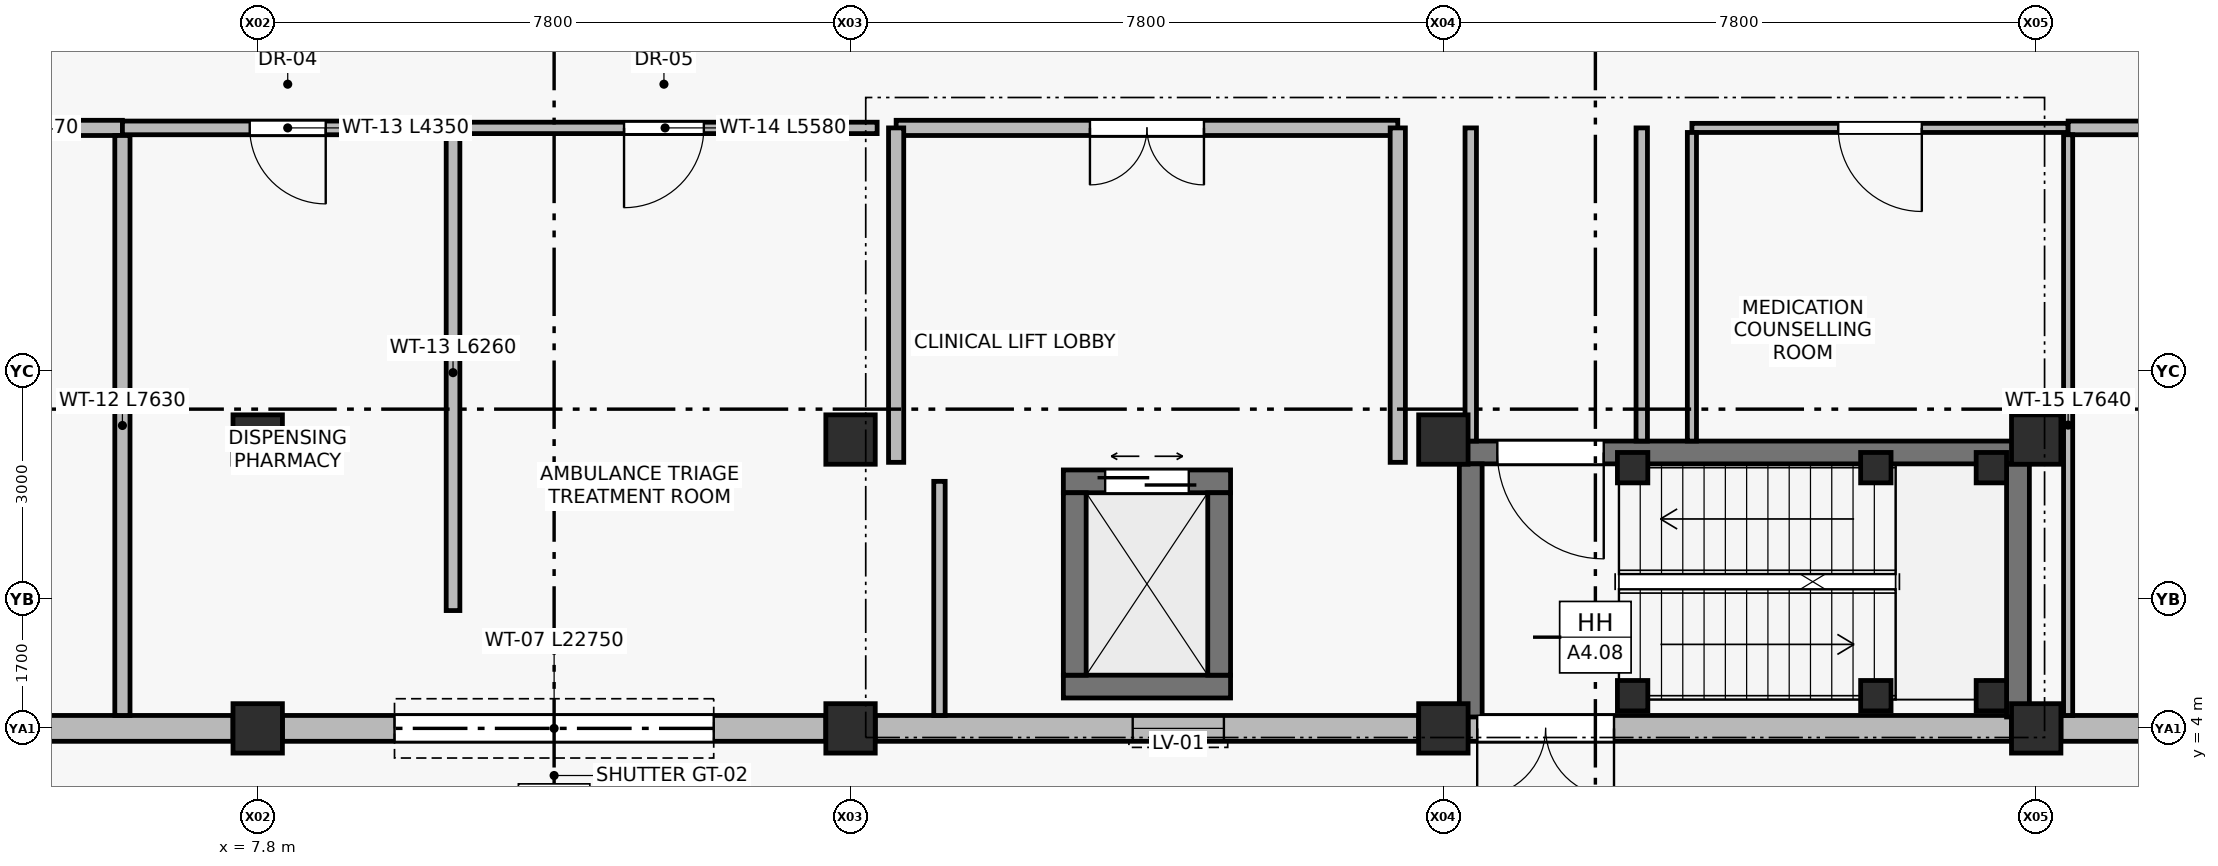
"""IFC4 building model, lengths in metres.
Left out: names, types, materials, properties, quantities, classifications, styles, units other than length and angle.
Written with IfcOpenShell. Run it as: python <this file> out.ifc"""

import sys

from ifc_helpers import new_model, si_unit, direction, frame, frame_2d, origin, origin_2d, place, context, subcontext, project, spatial, rectangle, extrude, element, fill, save


model = new_model("IFC4")
c1 = context("Model", 3, precision=1e-05, world=origin(), true_north=direction((0.0, 1.0)))
c2 = subcontext(c1, "Body", "Model", "MODEL_VIEW")
j1 = project(units=[si_unit("LENGTHUNIT", "METRE"), si_unit("PLANEANGLEUNIT", "RADIAN")], contexts=[c1])
p1 = place(None, origin())
s1 = spatial("IfcSite", under=j1, at=p1, CompositionType="ELEMENT")
p2 = place(p1, origin())
s2 = spatial("IfcBuilding", under=s1, at=p2, CompositionType="ELEMENT")
p3 = place(p2, origin())
s3 = spatial("IfcBuildingStorey", under=s2, at=p3, CompositionType="ELEMENT", Elevation=0.0)
for number, where, z_axis, x_axis in (
    (1, (7.8, 4.0, 0.0), (0.0, 0.0, 1.0), (1.0, 0.0, 0.0)),
    (2, (7.8, 7.8, 0.0), (0.0, 0.0, 1.0), (1.0, 0.0, 0.0)),
    (3, (15.6, 4.0, 0.0), (0.0, 0.0, 1.0), (1.0, 0.0, 0.0)),
    (4, (15.6, 7.8, 0.0), (0.0, 0.0, 1.0), (1.0, 0.0, 0.0)),
    (5, (23.4, 4.0, 0.0), (0.0, 0.0, 1.0), (1.0, 0.0, 0.0)),
    (6, (23.4, 7.8, 0.0), (0.0, 0.0, 1.0), (1.0, 0.0, 0.0)),
    (7, (31.2, 4.0, 0.0), (0.0, 0.0, 1.0), (1.0, 0.0, 0.0)),
    (8, (31.2, 7.8, 0.0), (0.0, 0.0, 1.0), (1.0, 0.0, 0.0)),
):
    element("IfcColumn", number, at=place(p3, frame(where, z_axis=z_axis, x_axis=x_axis)), inside=s3, PredefinedType="COLUMN", context=c2, shape_type="SweptSolid", body=[
        extrude(rectangle(XDim=0.65, YDim=0.65, at=origin_2d()), origin(), (0.0, 0.0, 1.0), 4.8),
    ])
for number, where, z_axis, x_axis in (
    (9, (25.89, 4.43, 0.0), (0.0, 0.0, 1.0), (1.0, 0.0, 0.0)),
    (10, (25.89, 7.43, 0.0), (0.0, 0.0, 1.0), (1.0, 0.0, 0.0)),
    (11, (29.09, 4.43, 0.0), (0.0, 0.0, 1.0), (1.0, 0.0, 0.0)),
    (12, (29.09, 7.43, 0.0), (0.0, 0.0, 1.0), (1.0, 0.0, 0.0)),
    (13, (30.61, 4.43, 0.0), (0.0, 0.0, 1.0), (1.0, 0.0, 0.0)),
    (14, (30.61, 7.43, 0.0), (0.0, 0.0, 1.0), (1.0, 0.0, 0.0)),
):
    element("IfcColumn", number, at=place(p3, frame(where, z_axis=z_axis, x_axis=x_axis)), inside=s3, PredefinedType="COLUMN", context=c2, shape_type="SweptSolid", body=[
        extrude(rectangle(XDim=0.4, YDim=0.4, at=origin_2d()), origin(), (0.0, 0.0, 1.0), 4.8),
    ])
p4 = place(p3, frame((7.475, 4.0, 0.0), z_axis=(0.0, 0.0, 1.0), x_axis=(-1.0, 0.0, 0.0)))
e15 = element("IfcWall", 15, at=p4, inside=s3, PredefinedType="STANDARD", context=c2, shape_type="SweptSolid", body=[
    extrude(rectangle(XDim=7.15, YDim=0.34, at=frame_2d((3.575, 0.0))), origin(), (0.0, 0.0, 1.0), 4.04),
])
p5 = place(p4, frame((3.768, 0.0, 0.9)))
e16 = element("IfcOpeningElement", 16, at=p5, cuts=e15, PredefinedType="OPENING", context=c2, shape_type="SweptSolid", body=[
    extrude(rectangle(XDim=1.05, YDim=1.65, at=frame_2d((0.525, 0.825))), frame((0.0, 0.18, 0.0), z_axis=(0.0, -1.0, 0.0), x_axis=(1.0, 0.0, 0.0)), (0.0, 0.0, 1.0), 0.36),
])
p6 = place(p3, frame((15.275, 4.0, 0.0), z_axis=(0.0, 0.0, 1.0), x_axis=(-1.0, 0.0, 0.0)))
e17 = element("IfcWall", 17, at=p6, inside=s3, PredefinedType="STANDARD", context=c2, shape_type="SweptSolid", body=[
    extrude(rectangle(XDim=7.15, YDim=0.34, at=frame_2d((3.575, 0.0))), origin(), (0.0, 0.0, 1.0), 3.35),
])
p7 = place(p6, frame((1.475, 0.0, 0.0)))
e18 = element("IfcOpeningElement", 18, at=p7, cuts=e17, PredefinedType="OPENING", context=c2, shape_type="SweptSolid", body=[
    extrude(rectangle(XDim=4.2, YDim=3.1, at=frame_2d((2.1, 1.55))), frame((0.0, 0.18, 0.0), z_axis=(0.0, -1.0, 0.0), x_axis=(1.0, 0.0, 0.0)), (0.0, 0.0, 1.0), 0.36),
])
p8 = place(p3, frame((23.075, 4.0, 0.0), z_axis=(0.0, 0.0, 1.0), x_axis=(-1.0, 0.0, 0.0)))
e19 = element("IfcWall", 19, at=p8, inside=s3, PredefinedType="STANDARD", context=c2, shape_type="SweptSolid", body=[
    extrude(rectangle(XDim=7.15, YDim=0.34, at=frame_2d((3.575, 0.0))), origin(), (0.0, 0.0, 1.0), 4.04),
])
p9 = place(p8, frame((2.562, 0.0, 0.9)))
e20 = element("IfcOpeningElement", 20, at=p9, cuts=e19, PredefinedType="OPENING", context=c2, shape_type="SweptSolid", body=[
    extrude(rectangle(XDim=1.2, YDim=1.5, at=frame_2d((0.6, 0.75))), frame((0.0, 0.18, 0.0), z_axis=(0.0, -1.0, 0.0), x_axis=(1.0, 0.0, 0.0)), (0.0, 0.0, 1.0), 0.36),
])
p10 = place(p3, frame((30.875, 4.0, 0.0), z_axis=(0.0, 0.0, 1.0), x_axis=(-1.0, 0.0, 0.0)))
e21 = element("IfcWall", 21, at=p10, inside=s3, PredefinedType="STANDARD", context=c2, shape_type="SweptSolid", body=[
    extrude(rectangle(XDim=7.15, YDim=0.34, at=frame_2d((3.575, 0.0))), origin(), (0.0, 0.0, 1.0), 4.04),
])
p11 = place(p10, frame((5.23, 0.0, 0.0)))
e22 = element("IfcOpeningElement", 22, at=p11, cuts=e21, PredefinedType="OPENING", context=c2, shape_type="SweptSolid", body=[
    extrude(rectangle(XDim=1.8, YDim=2.25, at=frame_2d((0.9, 1.125))), frame((0.0, 0.18, 0.0), z_axis=(0.0, -1.0, 0.0), x_axis=(1.0, 0.0, 0.0)), (0.0, 0.0, 1.0), 0.36),
])
p12 = place(p3, frame((38.675, 4.0, 0.0), z_axis=(0.0, 0.0, 1.0), x_axis=(-1.0, 0.0, 0.0)))
e23 = element("IfcWall", 23, at=p12, inside=s3, PredefinedType="STANDARD", context=c2, shape_type="SweptSolid", body=[
    extrude(rectangle(XDim=7.15, YDim=0.34, at=frame_2d((3.575, 0.0))), origin(), (0.0, 0.0, 1.0), 3.35),
])
p13 = place(p12, frame((1.475, 0.0, 0.0)))
e24 = element("IfcOpeningElement", 24, at=p13, cuts=e23, PredefinedType="OPENING", context=c2, shape_type="SweptSolid", body=[
    extrude(rectangle(XDim=4.2, YDim=3.1, at=frame_2d((2.1, 1.55))), frame((0.0, 0.18, 0.0), z_axis=(0.0, -1.0, 0.0), x_axis=(1.0, 0.0, 0.0)), (0.0, 0.0, 1.0), 0.36),
])
p14 = place(p3, frame((31.11, 7.63, 0.0), z_axis=(0.0, 0.0, 1.0), x_axis=(-1.0, 0.0, 0.0)))
e25 = element("IfcWall", 25, at=p14, inside=s3, PredefinedType="SHEAR", context=c2, shape_type="SweptSolid", body=[
    extrude(rectangle(XDim=7.5, YDim=0.3, at=frame_2d((3.75, 0.0))), origin(), (0.0, 0.0, 1.0), 4.54),
])
p15 = place(p14, frame((5.6, 0.0, 0.0)))
e26 = element("IfcOpeningElement", 26, at=p15, cuts=e25, PredefinedType="OPENING", context=c2, shape_type="SweptSolid", body=[
    extrude(rectangle(XDim=1.4, YDim=2.2, at=frame_2d((0.7, 1.1))), frame((0.0, 0.16, 0.0), z_axis=(0.0, -1.0, 0.0), x_axis=(1.0, 0.0, 0.0)), (0.0, 0.0, 1.0), 0.32),
])
for number, where, z_axis, x_axis in (
    (27, (23.76, 7.48, 0.0), (0.0, 0.0, 1.0), (0.0, -1.0, 0.0)),
    (28, (30.96, 4.15, 0.0), (0.0, 0.0, 1.0), (0.0, 1.0, 0.0)),
):
    element("IfcWall", number, at=place(p3, frame(where, z_axis=z_axis, x_axis=x_axis)), inside=s3, PredefinedType="SHEAR", context=c2, shape_type="SweptSolid", body=[
        extrude(rectangle(XDim=3.33, YDim=0.3, at=frame_2d((1.665, 0.0))), origin(), (0.0, 0.0, 1.0), 4.54),
    ])
p16 = place(p3, frame((18.4, 4.55, 0.0), z_axis=(0.0, 0.0, 1.0), x_axis=(1.0, 0.0, 0.0)))
e29 = element("IfcWall", 29, at=p16, inside=s3, PredefinedType="SHEAR", context=c2, shape_type="SweptSolid", body=[
    extrude(rectangle(XDim=2.2, YDim=0.3, at=frame_2d((1.1, 0.0))), origin(), (0.0, 0.0, 1.0), 4.54),
])
p17 = place(p3, frame((20.6, 7.25, 0.0), z_axis=(0.0, 0.0, 1.0), x_axis=(-1.0, 0.0, 0.0)))
e30 = element("IfcWall", 30, at=p17, inside=s3, PredefinedType="SHEAR", context=c2, shape_type="SweptSolid", body=[
    extrude(rectangle(XDim=2.2, YDim=0.3, at=frame_2d((1.1, 0.0))), origin(), (0.0, 0.0, 1.0), 4.54),
])
p18 = place(p17, frame((0.55, 0.0, 0.0)))
e31 = element("IfcOpeningElement", 31, at=p18, cuts=e30, PredefinedType="OPENING", context=c2, shape_type="SweptSolid", body=[
    extrude(rectangle(XDim=1.1, YDim=2.2, at=frame_2d((0.55, 1.1))), frame((0.0, 0.16, 0.0), z_axis=(0.0, -1.0, 0.0), x_axis=(1.0, 0.0, 0.0)), (0.0, 0.0, 1.0), 0.32),
])
for number, where, z_axis, x_axis in (
    (32, (18.55, 7.1, 0.0), (0.0, 0.0, 1.0), (0.0, -1.0, 0.0)),
    (33, (20.45, 4.7, 0.0), (0.0, 0.0, 1.0), (0.0, 1.0, 0.0)),
):
    element("IfcWall", number, at=place(p3, frame(where, z_axis=z_axis, x_axis=x_axis)), inside=s3, PredefinedType="SHEAR", context=c2, shape_type="SweptSolid", body=[
        extrude(rectangle(XDim=2.4, YDim=0.3, at=frame_2d((1.2, 0.0))), origin(), (0.0, 0.0, 1.0), 4.54),
    ])
p19 = place(p3, frame((22.8, 11.9, 0.0), z_axis=(0.0, 0.0, 1.0), x_axis=(-1.0, 0.0, 0.0)))
e34 = element("IfcWall", 34, at=p19, inside=s3, PredefinedType="SOLIDWALL", context=c2, shape_type="SweptSolid", body=[
    extrude(rectangle(XDim=6.6, YDim=0.2, at=frame_2d((3.3, 0.0))), origin(), (0.0, 0.0, 1.0), 4.54),
])
p20 = place(p19, frame((2.55, 0.0, 0.0)))
e35 = element("IfcOpeningElement", 35, at=p20, cuts=e34, PredefinedType="OPENING", context=c2, shape_type="SweptSolid", body=[
    extrude(rectangle(XDim=1.5, YDim=2.2, at=frame_2d((0.75, 1.1))), frame((0.0, 0.11, 0.0), z_axis=(0.0, -1.0, 0.0), x_axis=(1.0, 0.0, 0.0)), (0.0, 0.0, 1.0), 0.22),
])
for number, where, z_axis, x_axis in (
    (36, (16.2, 11.9, 0.0), (0.0, 0.0, 1.0), (0.0, -1.0, 0.0)),
    (37, (22.8, 7.5, 0.0), (0.0, 0.0, 1.0), (0.0, 1.0, 0.0)),
):
    element("IfcWall", number, at=place(p3, frame(where, z_axis=z_axis, x_axis=x_axis)), inside=s3, PredefinedType="SOLIDWALL", context=c2, shape_type="SweptSolid", body=[
        extrude(rectangle(XDim=4.4, YDim=0.2, at=frame_2d((2.2, 0.0))), origin(), (0.0, 0.0, 1.0), 4.54),
    ])
p21 = place(p3, frame((23.76, 7.78, 0.0), z_axis=(0.0, 0.0, 1.0), x_axis=(0.0, 1.0, 0.0)))
e38 = element("IfcWall", 38, at=p21, inside=s3, PredefinedType="PARTITIONING", context=c2, shape_type="SweptSolid", body=[
    extrude(rectangle(XDim=4.12, YDim=0.15, at=frame_2d((2.06, 0.0))), origin(), (0.0, 0.0, 1.0), 4.09),
])
p22 = place(p3, frame((26.01, 7.78, 0.0), z_axis=(0.0, 0.0, 1.0), x_axis=(0.0, 1.0, 0.0)))
e39 = element("IfcWall", 39, at=p22, inside=s3, PredefinedType="PARTITIONING", context=c2, shape_type="SweptSolid", body=[
    extrude(rectangle(XDim=4.12, YDim=0.15, at=frame_2d((2.06, 0.0))), origin(), (0.0, 0.0, 1.0), 4.54),
])
p23 = place(p3, frame((6.02, 11.9, 0.0), z_axis=(0.0, 0.0, 1.0), x_axis=(-1.0, 0.0, 0.0)))
e40 = element("IfcWall", 40, at=p23, inside=s3, PredefinedType="SOLIDWALL", context=c2, shape_type="SweptSolid", body=[
    extrude(rectangle(XDim=4.47, YDim=0.2, at=frame_2d((2.235, 0.0))), origin(), (0.0, 0.0, 1.0), 4.54),
])
p24 = place(p23, frame((2.475, 0.0, 0.0)))
e41 = element("IfcOpeningElement", 41, at=p24, cuts=e40, PredefinedType="OPENING", context=c2, shape_type="SweptSolid", body=[
    extrude(rectangle(XDim=0.9, YDim=2.1, at=frame_2d((0.45, 1.05))), frame((0.0, 0.11, 0.0), z_axis=(0.0, -1.0, 0.0), x_axis=(1.0, 0.0, 0.0)), (0.0, 0.0, 1.0), 0.22),
])
p25 = place(p3, frame((10.37, 11.9, 0.0), z_axis=(0.0, 0.0, 1.0), x_axis=(-1.0, 0.0, 0.0)))
e42 = element("IfcWall", 42, at=p25, inside=s3, PredefinedType="PARTITIONING", context=c2, shape_type="SweptSolid", body=[
    extrude(rectangle(XDim=4.35, YDim=0.18, at=frame_2d((2.175, 0.0))), origin(), (0.0, 0.0, 1.0), 4.54),
])
p26 = place(p25, frame((1.675, 0.0, 0.0)))
e43 = element("IfcOpeningElement", 43, at=p26, cuts=e42, PredefinedType="OPENING", context=c2, shape_type="SweptSolid", body=[
    extrude(rectangle(XDim=1.0, YDim=2.1, at=frame_2d((0.5, 1.05))), frame((0.0, 0.1, 0.0), z_axis=(0.0, -1.0, 0.0), x_axis=(1.0, 0.0, 0.0)), (0.0, 0.0, 1.0), 0.2),
])
p27 = place(p3, frame((15.95, 11.9, 0.0), z_axis=(0.0, 0.0, 1.0), x_axis=(-1.0, 0.0, 0.0)))
e44 = element("IfcWall", 44, at=p27, inside=s3, PredefinedType="PARTITIONING", context=c2, shape_type="SweptSolid", body=[
    extrude(rectangle(XDim=5.58, YDim=0.15, at=frame_2d((2.79, 0.0))), origin(), (0.0, 0.0, 1.0), 4.54),
])
p28 = place(p27, frame((2.28, 0.0, 0.0)))
e45 = element("IfcOpeningElement", 45, at=p28, cuts=e44, PredefinedType="OPENING", context=c2, shape_type="SweptSolid", body=[
    extrude(rectangle(XDim=1.05, YDim=2.15, at=frame_2d((0.525, 1.075))), frame((0.0, 0.085, 0.0), z_axis=(0.0, -1.0, 0.0), x_axis=(1.0, 0.0, 0.0)), (0.0, 0.0, 1.0), 0.17),
])
p29 = place(p3, frame((31.62, 11.9, 0.0), z_axis=(0.0, 0.0, 1.0), x_axis=(-1.0, 0.0, 0.0)))
e46 = element("IfcWall", 46, at=p29, inside=s3, PredefinedType="PARTITIONING", context=c2, shape_type="SweptSolid", body=[
    extrude(rectangle(XDim=4.95, YDim=0.12, at=frame_2d((2.475, 0.0))), origin(), (0.0, 0.0, 1.0), 4.54),
])
p30 = place(p29, frame((1.925, 0.0, 0.0)))
e47 = element("IfcOpeningElement", 47, at=p30, cuts=e46, PredefinedType="OPENING", context=c2, shape_type="SweptSolid", body=[
    extrude(rectangle(XDim=1.1, YDim=2.15, at=frame_2d((0.55, 1.075))), frame((0.0, 0.07, 0.0), z_axis=(0.0, -1.0, 0.0), x_axis=(1.0, 0.0, 0.0)), (0.0, 0.0, 1.0), 0.14),
])
p31 = place(p3, frame((39.15, 11.9, 0.0), z_axis=(0.0, 0.0, 1.0), x_axis=(-1.0, 0.0, 0.0)))
e48 = element("IfcWall", 48, at=p31, inside=s3, PredefinedType="PARTITIONING", context=c2, shape_type="SweptSolid", body=[
    extrude(rectangle(XDim=7.53, YDim=0.18, at=frame_2d((3.765, 0.0))), origin(), (0.0, 0.0, 1.0), 4.54),
])
p32 = place(p31, frame((3.19, 0.0, 0.0)))
e49 = element("IfcOpeningElement", 49, at=p32, cuts=e48, PredefinedType="OPENING", context=c2, shape_type="SweptSolid", body=[
    extrude(rectangle(XDim=1.15, YDim=2.2, at=frame_2d((0.575, 1.1))), frame((0.0, 0.1, 0.0), z_axis=(0.0, -1.0, 0.0), x_axis=(1.0, 0.0, 0.0)), (0.0, 0.0, 1.0), 0.2),
])
p33 = place(p3, frame((6.02, 4.17, 0.0), z_axis=(0.0, 0.0, 1.0), x_axis=(0.0, 1.0, 0.0)))
e50 = element("IfcWall", 50, at=p33, inside=s3, PredefinedType="SOLIDWALL", context=c2, shape_type="SweptSolid", body=[
    extrude(rectangle(XDim=7.63, YDim=0.2, at=frame_2d((3.815, 0.0))), origin(), (0.0, 0.0, 1.0), 4.54),
])
p34 = place(p3, frame((10.37, 5.55, 0.0), z_axis=(0.0, 0.0, 1.0), x_axis=(0.0, 1.0, 0.0)))
e51 = element("IfcWall", 51, at=p34, inside=s3, PredefinedType="PARTITIONING", context=c2, shape_type="SweptSolid", body=[
    extrude(rectangle(XDim=6.26, YDim=0.18, at=frame_2d((3.13, 0.0))), origin(), (0.0, 0.0, 1.0), 4.21),
])
p35 = place(p3, frame((16.77, 4.17, 0.0), z_axis=(0.0, 0.0, 1.0), x_axis=(0.0, 1.0, 0.0)))
e52 = element("IfcWall", 52, at=p35, inside=s3, PredefinedType="PARTITIONING", context=c2, shape_type="SweptSolid", body=[
    extrude(rectangle(XDim=3.08, YDim=0.15, at=frame_2d((1.54, 0.0))), origin(), (0.0, 0.0, 1.0), 4.54),
])
p36 = place(p3, frame((26.67, 7.78, 0.0), z_axis=(0.0, 0.0, 1.0), x_axis=(0.0, 1.0, 0.0)))
e53 = element("IfcWall", 53, at=p36, inside=s3, PredefinedType="PARTITIONING", context=c2, shape_type="SweptSolid", body=[
    extrude(rectangle(XDim=4.06, YDim=0.12, at=frame_2d((2.03, 0.0))), origin(), (0.0, 0.0, 1.0), 4.54),
])
p37 = place(p3, frame((31.62, 4.17, 0.0), z_axis=(0.0, 0.0, 1.0), x_axis=(0.0, 1.0, 0.0)))
e54 = element("IfcWall", 54, at=p37, inside=s3, PredefinedType="PARTITIONING", context=c2, shape_type="SweptSolid", body=[
    extrude(rectangle(XDim=7.64, YDim=0.12, at=frame_2d((3.82, 0.0))), origin(), (0.0, 0.0, 1.0), 4.54),
])
p38 = place(p7, frame((4.2, 0.0, 0.0), z_axis=(0.0, 0.0, 1.0), x_axis=(-1.0, 0.0, 0.0)))
e55 = element("IfcDoor", 55, at=p38, inside=s3, OperationType="ROLLINGUP", PredefinedType="GATE", context=c2, shape_type="SweptSolid", body=[
    extrude(rectangle(XDim=4.2, YDim=3.1, at=frame_2d((2.1, 1.55))), frame((0.0, 0.025, 0.0), z_axis=(0.0, -1.0, 0.0), x_axis=(1.0, 0.0, 0.0)), (0.0, 0.0, 1.0), 0.05),
])
fill(e18, e55)
p39 = place(p9, origin())
e56 = element("IfcWindow", 56, at=p39, inside=s3, PartitioningType="SINGLE_PANEL", PredefinedType="WINDOW", context=c2, shape_type="SweptSolid", body=[
    extrude(rectangle(XDim=1.2, YDim=1.5, at=frame_2d((0.6, 0.75))), frame((0.0, 0.03, 0.0), z_axis=(0.0, -1.0, 0.0), x_axis=(1.0, 0.0, 0.0)), (0.0, 0.0, 1.0), 0.06),
])
fill(e20, e56)
p40 = place(p11, origin())
e57 = element("IfcDoor", 57, at=p40, inside=s3, OperationType="DOUBLE_DOOR_SINGLE_SWING", PredefinedType="DOOR", context=c2, shape_type="SweptSolid", body=[
    extrude(rectangle(XDim=1.8, YDim=2.25, at=frame_2d((0.9, 1.125))), frame((0.0, 0.025, 0.0), z_axis=(0.0, -1.0, 0.0), x_axis=(1.0, 0.0, 0.0)), (0.0, 0.0, 1.0), 0.05),
])
fill(e22, e57)
p41 = place(p15, origin())
e58 = element("IfcDoor", 58, at=p41, inside=s3, OperationType="SINGLE_SWING_LEFT", PredefinedType="DOOR", context=c2, shape_type="SweptSolid", body=[
    extrude(rectangle(XDim=1.4, YDim=2.2, at=frame_2d((0.7, 1.1))), frame((0.0, 0.025, 0.0), z_axis=(0.0, -1.0, 0.0), x_axis=(1.0, 0.0, 0.0)), (0.0, 0.0, 1.0), 0.05),
])
fill(e26, e58)
p42 = place(p18, origin())
e59 = element("IfcDoor", 59, at=p42, inside=s3, OperationType="DOUBLE_DOOR_SLIDING", PredefinedType="DOOR", context=c2, shape_type="SweptSolid", body=[
    extrude(rectangle(XDim=1.1, YDim=2.2, at=frame_2d((0.55, 1.1))), frame((0.0, 0.025, 0.0), z_axis=(0.0, -1.0, 0.0), x_axis=(1.0, 0.0, 0.0)), (0.0, 0.0, 1.0), 0.05),
])
fill(e31, e59)
p43 = place(p20, origin())
e60 = element("IfcDoor", 60, at=p43, inside=s3, OperationType="DOUBLE_DOOR_SINGLE_SWING", PredefinedType="DOOR", context=c2, shape_type="SweptSolid", body=[
    extrude(rectangle(XDim=1.5, YDim=2.2, at=frame_2d((0.75, 1.1))), frame((0.0, 0.025, 0.0), z_axis=(0.0, -1.0, 0.0), x_axis=(1.0, 0.0, 0.0)), (0.0, 0.0, 1.0), 0.05),
])
fill(e35, e60)
p44 = place(p26, origin())
e61 = element("IfcDoor", 61, at=p44, inside=s3, OperationType="SINGLE_SWING_LEFT", PredefinedType="DOOR", context=c2, shape_type="SweptSolid", body=[
    extrude(rectangle(XDim=1.0, YDim=2.1, at=frame_2d((0.5, 1.05))), frame((0.0, 0.025, 0.0), z_axis=(0.0, -1.0, 0.0), x_axis=(1.0, 0.0, 0.0)), (0.0, 0.0, 1.0), 0.05),
])
fill(e43, e61)
p45 = place(p28, origin())
e62 = element("IfcDoor", 62, at=p45, inside=s3, OperationType="SINGLE_SWING_RIGHT", PredefinedType="DOOR", context=c2, shape_type="SweptSolid", body=[
    extrude(rectangle(XDim=1.05, YDim=2.15, at=frame_2d((0.525, 1.075))), frame((0.0, 0.025, 0.0), z_axis=(0.0, -1.0, 0.0), x_axis=(1.0, 0.0, 0.0)), (0.0, 0.0, 1.0), 0.05),
])
fill(e45, e62)
p46 = place(p30, origin())
e63 = element("IfcDoor", 63, at=p46, inside=s3, OperationType="SINGLE_SWING_LEFT", PredefinedType="DOOR", context=c2, shape_type="SweptSolid", body=[
    extrude(rectangle(XDim=1.1, YDim=2.15, at=frame_2d((0.55, 1.075))), frame((0.0, 0.025, 0.0), z_axis=(0.0, -1.0, 0.0), x_axis=(1.0, 0.0, 0.0)), (0.0, 0.0, 1.0), 0.05),
])
fill(e47, e63)
save(model, sys.argv[1])
